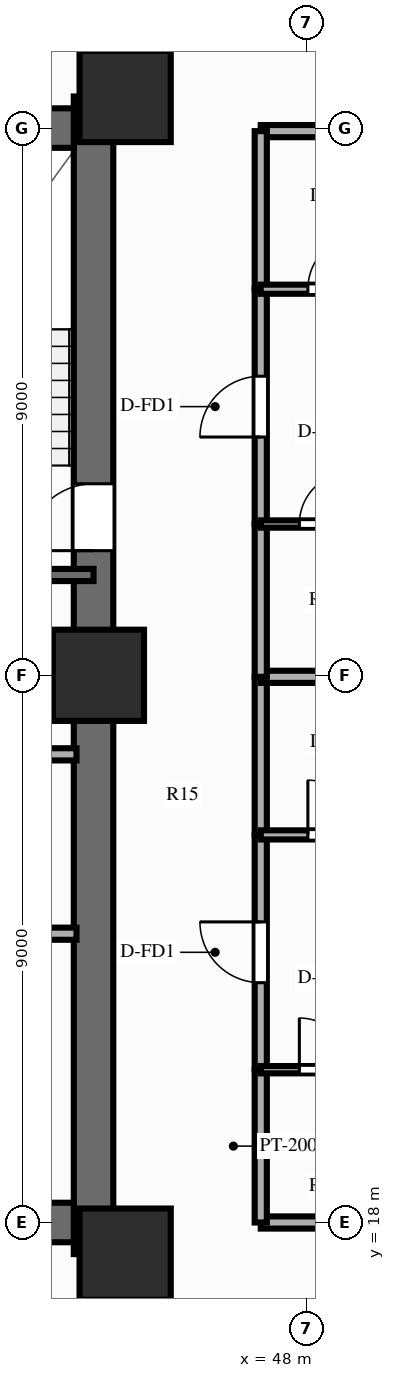
"""IFC4 building model, lengths in metres.
Left out: names, types, materials, properties, quantities, classifications, styles, units other than length and angle.
Written with IfcOpenShell. Run it as: python <this file> out.ifc"""

import sys

from ifc_helpers import new_model, si_unit, direction, frame, frame_2d, origin, origin_2d, place, context, subcontext, project, spatial, rectangle, extrude, source, transform, mapped, element, fill, save


model = new_model("IFC4")
c1 = context("Model", 3, precision=1e-05, world=origin(), true_north=direction((0.0, 1.0)))
c2 = subcontext(c1, "Body", "Model", "MODEL_VIEW")
j1 = project(units=[si_unit("LENGTHUNIT", "METRE"), si_unit("PLANEANGLEUNIT", "RADIAN")], contexts=[c1])
p1 = place(None, origin())
s1 = spatial("IfcSite", under=j1, at=p1, CompositionType="ELEMENT")
p2 = place(p1, origin())
s2 = spatial("IfcBuilding", under=s1, at=p2, CompositionType="ELEMENT")
p3 = place(p2, frame((0.0, 0.0, 34.4)))
s3 = spatial("IfcBuildingStorey", under=s2, at=p3, CompositionType="ELEMENT", Elevation=34.4)
p4 = place(p3, frame((44.5, 17.48, 0.0), z_axis=(0.0, 0.0, 1.0), x_axis=(0.0, 1.0, 0.0)))
e1 = element("IfcWall", 1, at=p4, inside=s3, PredefinedType="SHEAR", context=c2, shape_type="SweptSolid", body=[
    extrude(rectangle(XDim=19.04, YDim=0.65, at=frame_2d((9.52, 0.0))), origin(), (0.0, 0.0, 1.0), 3.0),
])
p5 = place(p4, frame((12.67, 0.0, 0.0), z_axis=(0.0, 0.0, 1.0), x_axis=(-1.0, 0.0, 0.0)))
e2 = element("IfcOpeningElement", 2, at=p5, cuts=e1, PredefinedType="OPENING", context=c2, shape_type="SweptSolid", body=[
    extrude(rectangle(XDim=1.1, YDim=2.15, at=frame_2d((0.55, 1.075))), frame((0.0, 0.337, 0.0), z_axis=(0.0, -1.0, 0.0), x_axis=(1.0, 0.0, 0.0)), (0.0, 0.0, 1.0), 0.674),
])
p6 = place(p3, frame((31.825, 18.0, 0.0), z_axis=(0.0, 0.0, 1.0), x_axis=(1.0, 0.0, 0.0)))
e3 = element("IfcWall", 3, at=p6, inside=s3, PredefinedType="SHEAR", context=c2, shape_type="SweptSolid", body=[
    extrude(rectangle(XDim=12.35, YDim=0.65, at=frame_2d((6.175, 0.0))), origin(), (0.0, 0.0, 1.0), 3.0),
])
p7 = place(p3, frame((31.825, 36.0, 0.0), z_axis=(0.0, 0.0, 1.0), x_axis=(1.0, 0.0, 0.0)))
e4 = element("IfcWall", 4, at=p7, inside=s3, PredefinedType="SHEAR", context=c2, shape_type="SweptSolid", body=[
    extrude(rectangle(XDim=12.35, YDim=0.65, at=frame_2d((6.175, 0.0))), origin(), (0.0, 0.0, 1.0), 3.0),
])
p8 = place(p7, frame((5.125, 0.0, 0.0), z_axis=(0.0, 0.0, 1.0), x_axis=(-1.0, 0.0, 0.0)))
e5 = element("IfcOpeningElement", 5, at=p8, cuts=e4, PredefinedType="OPENING", context=c2, shape_type="SweptSolid", body=[
    extrude(rectangle(XDim=1.4, YDim=2.15, at=frame_2d((0.7, 1.075))), frame((0.0, 0.337, 0.0), z_axis=(0.0, -1.0, 0.0), x_axis=(1.0, 0.0, 0.0)), (0.0, 0.0, 1.0), 0.674),
])
m1 = source(origin(), c2, "Body", "SweptSolid", [
    extrude(rectangle(XDim=1.5, YDim=1.5, at=origin_2d()), origin(), (0.0, 0.0, 1.0), 3.0),
])
for number, where, z_axis, x_axis in (
    (6, (45.02, 17.48, 0.0), (0.0, 0.0, 1.0), (1.0, 0.0, 0.0)),
    (7, (45.02, 36.52, 0.0), (0.0, 0.0, 1.0), (1.0, 0.0, 0.0)),
    (8, (44.58, 27.0, 0.0), (0.0, 0.0, 1.0), (1.0, 0.0, 0.0)),
):
    element("IfcColumn", number, at=place(p3, frame(where, z_axis=z_axis, x_axis=x_axis)), inside=s3, PredefinedType="COLUMN", context=c2, shape_type="MappedRepresentation", body=[
        mapped(m1, transform((0.0, 0.0, 0.0), scale=1.0)),
    ])
p9 = place(p3, frame((41.55, 22.75, 0.0), z_axis=(0.0, 0.0, 1.0), x_axis=(1.0, 0.0, 0.0)))
e9 = element("IfcWall", 9, at=p9, inside=s3, PredefinedType="PARTITIONING", context=c2, shape_type="SweptSolid", body=[
    extrude(rectangle(XDim=2.67, YDim=0.2, at=frame_2d((1.335, 0.0))), origin(), (0.0, 0.0, 1.0), 2.79),
])
p10 = place(p3, frame((41.55, 25.7, 0.0), z_axis=(0.0, 0.0, 1.0), x_axis=(1.0, 0.0, 0.0)))
e10 = element("IfcWall", 10, at=p10, inside=s3, PredefinedType="PARTITIONING", context=c2, shape_type="SweptSolid", body=[
    extrude(rectangle(XDim=2.67, YDim=0.2, at=frame_2d((1.335, 0.0))), origin(), (0.0, 0.0, 1.0), 2.14),
])
p11 = place(p3, frame((40.57, 28.65, 0.0), z_axis=(0.0, 0.0, 1.0), x_axis=(1.0, 0.0, 0.0)))
e11 = element("IfcWall", 11, at=p11, inside=s3, PredefinedType="SOLIDWALL", context=c2, shape_type="SweptSolid", body=[
    extrude(rectangle(XDim=3.93, YDim=0.2, at=frame_2d((1.965, 0.0))), origin(), (0.0, 0.0, 1.0), 2.79),
])
for number, where, z_axis, x_axis in (
    (12, (47.25, 18.0, 0.0), (0.0, 0.0, 1.0), (1.0, 0.0, 0.0)),
    (13, (47.25, 35.95, 0.0), (0.0, 0.0, 1.0), (1.0, 0.0, 0.0)),
):
    element("IfcWall", number, at=place(p3, frame(where, z_axis=z_axis, x_axis=x_axis)), inside=s3, PredefinedType="PARTITIONING", context=c2, shape_type="SweptSolid", body=[
        extrude(rectangle(XDim=16.6, YDim=0.2, at=frame_2d((8.3, 0.0))), origin(), (0.0, 0.0, 1.0), 2.24),
    ])
p12 = place(p3, frame((47.25, 18.0, 0.0), z_axis=(0.0, 0.0, 1.0), x_axis=(0.0, 1.0, 0.0)))
e14 = element("IfcWall", 14, at=p12, inside=s3, PredefinedType="PARTITIONING", context=c2, shape_type="SweptSolid", body=[
    extrude(rectangle(XDim=2.513, YDim=0.2, at=frame_2d((1.256, 0.0))), origin(), (0.0, 0.0, 1.0), 2.79),
])
p13 = place(p3, frame((47.25, 20.513, 0.0), z_axis=(0.0, 0.0, 1.0), x_axis=(0.0, 1.0, 0.0)))
e15 = element("IfcWall", 15, at=p13, inside=s3, PredefinedType="PARTITIONING", context=c2, shape_type="SweptSolid", body=[
    extrude(rectangle(XDim=3.862, YDim=0.2, at=frame_2d((1.931, 0.0))), origin(), (0.0, 0.0, 1.0), 2.79),
])
p14 = place(p13, frame((1.431, 0.0, 0.0)))
e16 = element("IfcOpeningElement", 16, at=p14, cuts=e15, PredefinedType="OPENING", context=c2, shape_type="SweptSolid", body=[
    extrude(rectangle(XDim=1.0, YDim=2.15, at=frame_2d((0.5, 1.075))), frame((0.0, 0.112, 0.0), z_axis=(0.0, -1.0, 0.0), x_axis=(1.0, 0.0, 0.0)), (0.0, 0.0, 1.0), 0.224),
])
p15 = place(p3, frame((47.25, 24.375, 0.0), z_axis=(0.0, 0.0, 1.0), x_axis=(0.0, 1.0, 0.0)))
e17 = element("IfcWall", 17, at=p15, inside=s3, PredefinedType="PARTITIONING", context=c2, shape_type="SweptSolid", body=[
    extrude(rectangle(XDim=2.6, YDim=0.2, at=frame_2d((1.3, 0.0))), origin(), (0.0, 0.0, 1.0), 2.79),
])
p16 = place(p3, frame((47.25, 20.513, 0.0), z_axis=(0.0, 0.0, 1.0), x_axis=(1.0, 0.0, 0.0)))
e18 = element("IfcWall", 18, at=p16, inside=s3, PredefinedType="PARTITIONING", context=c2, shape_type="SweptSolid", body=[
    extrude(rectangle(XDim=2.12, YDim=0.12, at=frame_2d((1.06, 0.0))), origin(), (0.0, 0.0, 1.0), 2.79),
])
p17 = place(p16, frame((0.635, 0.0, 0.0)))
e19 = element("IfcOpeningElement", 19, at=p17, cuts=e18, PredefinedType="OPENING", context=c2, shape_type="SweptSolid", body=[
    extrude(rectangle(XDim=0.85, YDim=2.05, at=frame_2d((0.425, 1.025))), frame((0.0, 0.072, 0.0), z_axis=(0.0, -1.0, 0.0), x_axis=(1.0, 0.0, 0.0)), (0.0, 0.0, 1.0), 0.144),
])
p18 = place(p3, frame((47.25, 24.375, 0.0), z_axis=(0.0, 0.0, 1.0), x_axis=(1.0, 0.0, 0.0)))
e20 = element("IfcWall", 20, at=p18, inside=s3, PredefinedType="PARTITIONING", context=c2, shape_type="SweptSolid", body=[
    extrude(rectangle(XDim=2.45, YDim=0.15, at=frame_2d((1.225, 0.0))), origin(), (0.0, 0.0, 1.0), 2.79),
])
p19 = place(p18, frame((0.775, 0.0, 0.0)))
e21 = element("IfcOpeningElement", 21, at=p19, cuts=e20, PredefinedType="OPENING", context=c2, shape_type="SweptSolid", body=[
    extrude(rectangle(XDim=0.9, YDim=2.1, at=frame_2d((0.45, 1.05))), frame((0.0, 0.087, 0.0), z_axis=(0.0, -1.0, 0.0), x_axis=(1.0, 0.0, 0.0)), (0.0, 0.0, 1.0), 0.174),
])
p20 = place(p3, frame((47.25, 26.975, 0.0), z_axis=(0.0, 0.0, 1.0), x_axis=(1.0, 0.0, 0.0)))
e22 = element("IfcWall", 22, at=p20, inside=s3, PredefinedType="PARTITIONING", context=c2, shape_type="SweptSolid", body=[
    extrude(rectangle(XDim=16.6, YDim=0.2, at=frame_2d((8.3, 0.0))), origin(), (0.0, 0.0, 1.0), 2.79),
])
p21 = place(p3, frame((47.25, 26.975, 0.0), z_axis=(0.0, 0.0, 1.0), x_axis=(0.0, 1.0, 0.0)))
e23 = element("IfcWall", 23, at=p21, inside=s3, PredefinedType="PARTITIONING", context=c2, shape_type="SweptSolid", body=[
    extrude(rectangle(XDim=2.513, YDim=0.2, at=frame_2d((1.256, 0.0))), origin(), (0.0, 0.0, 1.0), 2.79),
])
p22 = place(p3, frame((47.25, 29.488, 0.0), z_axis=(0.0, 0.0, 1.0), x_axis=(0.0, 1.0, 0.0)))
e24 = element("IfcWall", 24, at=p22, inside=s3, PredefinedType="PARTITIONING", context=c2, shape_type="SweptSolid", body=[
    extrude(rectangle(XDim=3.862, YDim=0.2, at=frame_2d((1.931, 0.0))), origin(), (0.0, 0.0, 1.0), 2.79),
])
p23 = place(p22, frame((1.431, 0.0, 0.0)))
e25 = element("IfcOpeningElement", 25, at=p23, cuts=e24, PredefinedType="OPENING", context=c2, shape_type="SweptSolid", body=[
    extrude(rectangle(XDim=1.0, YDim=2.15, at=frame_2d((0.5, 1.075))), frame((0.0, 0.112, 0.0), z_axis=(0.0, -1.0, 0.0), x_axis=(1.0, 0.0, 0.0)), (0.0, 0.0, 1.0), 0.224),
])
p24 = place(p3, frame((47.25, 33.35, 0.0), z_axis=(0.0, 0.0, 1.0), x_axis=(0.0, 1.0, 0.0)))
e26 = element("IfcWall", 26, at=p24, inside=s3, PredefinedType="PARTITIONING", context=c2, shape_type="SweptSolid", body=[
    extrude(rectangle(XDim=2.6, YDim=0.2, at=frame_2d((1.3, 0.0))), origin(), (0.0, 0.0, 1.0), 2.79),
])
p25 = place(p3, frame((47.25, 29.488, 0.0), z_axis=(0.0, 0.0, 1.0), x_axis=(1.0, 0.0, 0.0)))
e27 = element("IfcWall", 27, at=p25, inside=s3, PredefinedType="PARTITIONING", context=c2, shape_type="SweptSolid", body=[
    extrude(rectangle(XDim=2.12, YDim=0.12, at=frame_2d((1.06, 0.0))), origin(), (0.0, 0.0, 1.0), 2.79),
])
p26 = place(p25, frame((0.635, 0.0, 0.0)))
e28 = element("IfcOpeningElement", 28, at=p26, cuts=e27, PredefinedType="OPENING", context=c2, shape_type="SweptSolid", body=[
    extrude(rectangle(XDim=0.85, YDim=2.05, at=frame_2d((0.425, 1.025))), frame((0.0, 0.072, 0.0), z_axis=(0.0, -1.0, 0.0), x_axis=(1.0, 0.0, 0.0)), (0.0, 0.0, 1.0), 0.144),
])
p27 = place(p3, frame((47.25, 33.35, 0.0), z_axis=(0.0, 0.0, 1.0), x_axis=(1.0, 0.0, 0.0)))
e29 = element("IfcWall", 29, at=p27, inside=s3, PredefinedType="PARTITIONING", context=c2, shape_type="SweptSolid", body=[
    extrude(rectangle(XDim=2.45, YDim=0.15, at=frame_2d((1.225, 0.0))), origin(), (0.0, 0.0, 1.0), 2.79),
])
p28 = place(p27, frame((0.775, 0.0, 0.0)))
e30 = element("IfcOpeningElement", 30, at=p28, cuts=e29, PredefinedType="OPENING", context=c2, shape_type="SweptSolid", body=[
    extrude(rectangle(XDim=0.9, YDim=2.1, at=frame_2d((0.45, 1.05))), frame((0.0, 0.087, 0.0), z_axis=(0.0, -1.0, 0.0), x_axis=(1.0, 0.0, 0.0)), (0.0, 0.0, 1.0), 0.174),
])
m2 = source(origin(), c2, "Body", "SweptSolid", [
    extrude(rectangle(XDim=1.1, YDim=2.15, at=frame_2d((0.55, 1.075))), frame((0.0, 0.025, 0.0), z_axis=(0.0, -1.0, 0.0), x_axis=(1.0, 0.0, 0.0)), (0.0, 0.0, 1.0), 0.05),
])
p29 = place(p5, origin())
e31 = element("IfcDoor", 31, at=p29, inside=s3, OperationType="SINGLE_SWING_RIGHT", PredefinedType="DOOR", context=c2, shape_type="MappedRepresentation", body=[
    mapped(m2, transform((0.0, 0.0, 0.0), scale=1.0)),
])
fill(e2, e31)
m3 = source(origin(), c2, "Body", "SweptSolid", [
    extrude(rectangle(XDim=1.0, YDim=2.15, at=frame_2d((0.5, 1.075))), frame((0.0, 0.025, 0.0), z_axis=(0.0, -1.0, 0.0), x_axis=(1.0, 0.0, 0.0)), (0.0, 0.0, 1.0), 0.05),
])
p30 = place(p14, origin())
e32 = element("IfcDoor", 32, at=p30, inside=s3, OperationType="SINGLE_SWING_RIGHT", PredefinedType="DOOR", context=c2, shape_type="MappedRepresentation", body=[
    mapped(m3, transform((0.0, 0.0, 0.0), scale=1.0)),
])
fill(e16, e32)
m4 = source(origin(), c2, "Body", "SweptSolid", [
    extrude(rectangle(XDim=0.85, YDim=2.05, at=frame_2d((0.425, 1.025))), frame((0.0, 0.025, 0.0), z_axis=(0.0, -1.0, 0.0), x_axis=(1.0, 0.0, 0.0)), (0.0, 0.0, 1.0), 0.05),
])
p31 = place(p17, origin())
e33 = element("IfcDoor", 33, at=p31, inside=s3, OperationType="SINGLE_SWING_LEFT", PredefinedType="DOOR", context=c2, shape_type="MappedRepresentation", body=[
    mapped(m4, transform((0.0, 0.0, 0.0), scale=1.0)),
])
fill(e19, e33)
m5 = source(origin(), c2, "Body", "SweptSolid", [
    extrude(rectangle(XDim=0.9, YDim=2.1, at=frame_2d((0.45, 1.05))), frame((0.0, 0.025, 0.0), z_axis=(0.0, -1.0, 0.0), x_axis=(1.0, 0.0, 0.0)), (0.0, 0.0, 1.0), 0.05),
])
p32 = place(p19, origin())
e34 = element("IfcDoor", 34, at=p32, inside=s3, OperationType="SINGLE_SWING_LEFT", PredefinedType="DOOR", context=c2, shape_type="MappedRepresentation", body=[
    mapped(m5, transform((0.0, 0.0, 0.0), scale=1.0)),
])
fill(e21, e34)
p33 = place(p23, origin())
e35 = element("IfcDoor", 35, at=p33, inside=s3, OperationType="SINGLE_SWING_LEFT", PredefinedType="DOOR", context=c2, shape_type="MappedRepresentation", body=[
    mapped(m3, transform((0.0, 0.0, 0.0), scale=1.0)),
])
fill(e25, e35)
p34 = place(p26, origin())
e36 = element("IfcDoor", 36, at=p34, inside=s3, OperationType="SINGLE_SWING_RIGHT", PredefinedType="DOOR", context=c2, shape_type="MappedRepresentation", body=[
    mapped(m4, transform((0.0, 0.0, 0.0), scale=1.0)),
])
fill(e28, e36)
p35 = place(p28, origin())
e37 = element("IfcDoor", 37, at=p35, inside=s3, OperationType="SINGLE_SWING_RIGHT", PredefinedType="DOOR", context=c2, shape_type="MappedRepresentation", body=[
    mapped(m5, transform((0.0, 0.0, 0.0), scale=1.0)),
])
fill(e30, e37)
save(model, sys.argv[1])
